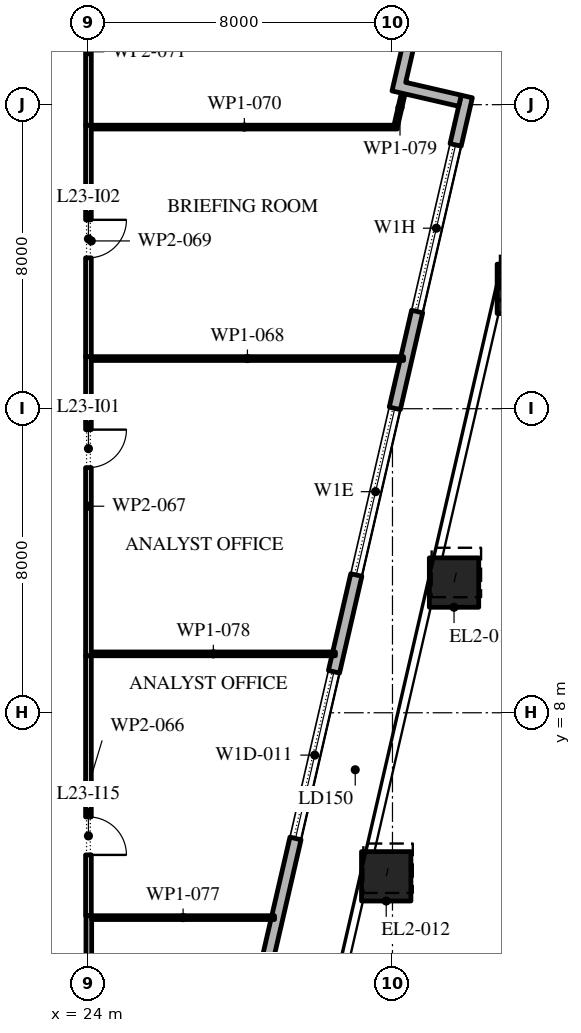
"""IFC4 building model, lengths in metres.
Left out: names, types, materials, properties, quantities, classifications, styles, units other than length and angle.
Written with IfcOpenShell. Run it as: python <this file> out.ifc"""

import sys

from ifc_helpers import new_model, si_unit, direction, frame, frame_2d, origin, origin_2d, place, context, subcontext, project, spatial, polyline, rectangle, outline, extrude, element, fill, save


model = new_model("IFC4")
c1 = context("Model", 3, precision=1e-05, world=origin(), true_north=direction((0.0, 1.0)))
c2 = subcontext(c1, "Body", "Model", "MODEL_VIEW")
j1 = project(units=[si_unit("LENGTHUNIT", "METRE"), si_unit("PLANEANGLEUNIT", "RADIAN")], contexts=[c1])
p1 = place(None, origin())
s1 = spatial("IfcSite", under=j1, at=p1, CompositionType="ELEMENT")
p2 = place(p1, origin())
s2 = spatial("IfcBuilding", under=s1, at=p2, CompositionType="ELEMENT")
p3 = place(p2, frame((0.0, 0.0, 109.8)))
s3 = spatial("IfcBuildingStorey", under=s2, at=p3, CompositionType="ELEMENT", Elevation=109.8)
p4 = place(p3, frame((31.835, 3.697, 0.0), z_axis=(0.01172631027, 0.050562456661, 0.998652057337), x_axis=(-0.974145569572, 0.225921245756, 0.0)))
e1 = element("IfcColumn", 1, at=p4, inside=s3, PredefinedType="COLUMN", context=c2, shape_type="SweptSolid", body=[
    extrude(rectangle(XDim=1.3, YDim=1.3, at=origin_2d()), origin(), (0.0, 0.0, 1.0), 4.206),
])
p5 = place(p3, frame((33.62, 11.426, 0.0), z_axis=(0.014617836866, 0.063111930596, 0.997899395261), x_axis=(-0.974209784844, 0.225644178107, 0.0)))
e2 = element("IfcColumn", 2, at=p5, inside=s3, PredefinedType="COLUMN", context=c2, shape_type="SweptSolid", body=[
    extrude(rectangle(XDim=1.3, YDim=1.3, at=origin_2d()), origin(), (0.0, 0.0, 1.0), 4.209),
])
p6 = place(p3, frame((35.404, 19.155, 0.0), z_axis=(0.01744401301, 0.075745265796, 0.996974604049), x_axis=(-0.974491627871, 0.224423856151, 0.0)))
e3 = element("IfcColumn", 3, at=p6, inside=s3, PredefinedType="COLUMN", context=c2, shape_type="SweptSolid", body=[
    extrude(rectangle(XDim=1.3, YDim=1.3, at=origin_2d()), origin(), (0.0, 0.0, 1.0), 4.213),
])
p7 = place(p3, frame((22.82, -24.016, 0.0), z_axis=(0.0, 0.0, 1.0), x_axis=(0.224953880882, 0.974369412223, 0.0)))
e4 = element("IfcWall", 4, at=p7, inside=s3, PredefinedType="STANDARD", context=c2, shape_type="SweptSolid", body=[
    extrude(rectangle(XDim=49.5, YDim=0.3, at=frame_2d((24.75, 0.0))), origin(), (0.0, 0.0, 1.0), 4.0),
])
p8 = place(p7, frame((1.157, 0.0, 0.45)))
e5 = element("IfcOpeningElement", 5, at=p8, cuts=e4, PredefinedType="OPENING", context=c2, shape_type="SweptSolid", body=[
    extrude(rectangle(XDim=4.5, YDim=3.05, at=frame_2d((2.25, 1.525))), frame((0.0, 0.16, 0.0), z_axis=(0.0, -1.0, 0.0), x_axis=(1.0, 0.0, 0.0)), (0.0, 0.0, 1.0), 0.32),
])
p9 = place(p7, frame((8.121, 0.0, 0.45)))
e6 = element("IfcOpeningElement", 6, at=p9, cuts=e4, PredefinedType="OPENING", context=c2, shape_type="SweptSolid", body=[
    extrude(rectangle(XDim=4.5, YDim=3.05, at=frame_2d((2.25, 1.525))), frame((0.0, 0.16, 0.0), z_axis=(0.0, -1.0, 0.0), x_axis=(1.0, 0.0, 0.0)), (0.0, 0.0, 1.0), 0.32),
])
p10 = place(p7, frame((15.236, 0.0, 0.45)))
e7 = element("IfcOpeningElement", 7, at=p10, cuts=e4, PredefinedType="OPENING", context=c2, shape_type="SweptSolid", body=[
    extrude(rectangle(XDim=4.5, YDim=3.05, at=frame_2d((2.25, 1.525))), frame((0.0, 0.16, 0.0), z_axis=(0.0, -1.0, 0.0), x_axis=(1.0, 0.0, 0.0)), (0.0, 0.0, 1.0), 0.32),
])
p11 = place(p7, frame((23.4, 0.0, 0.0)))
e8 = element("IfcOpeningElement", 8, at=p11, cuts=e4, PredefinedType="OPENING", context=c2, shape_type="SweptSolid", body=[
    extrude(rectangle(XDim=2.4, YDim=3.5, at=frame_2d((1.2, 1.75))), frame((0.0, 0.16, 0.0), z_axis=(0.0, -1.0, 0.0), x_axis=(1.0, 0.0, 0.0)), (0.0, 0.0, 1.0), 0.32),
])
p12 = place(p7, frame((29.464, 0.0, 0.45)))
e9 = element("IfcOpeningElement", 9, at=p12, cuts=e4, PredefinedType="OPENING", context=c2, shape_type="SweptSolid", body=[
    extrude(rectangle(XDim=4.5, YDim=2.875, at=frame_2d((2.25, 1.438))), frame((0.0, 0.16, 0.0), z_axis=(0.0, -1.0, 0.0), x_axis=(1.0, 0.0, 0.0)), (0.0, 0.0, 1.0), 0.32),
])
p13 = place(p7, frame((36.579, 0.0, 0.45)))
e10 = element("IfcOpeningElement", 10, at=p13, cuts=e4, PredefinedType="OPENING", context=c2, shape_type="SweptSolid", body=[
    extrude(rectangle(XDim=4.5, YDim=2.825, at=frame_2d((2.25, 1.413))), frame((0.0, 0.16, 0.0), z_axis=(0.0, -1.0, 0.0), x_axis=(1.0, 0.0, 0.0)), (0.0, 0.0, 1.0), 0.32),
])
p14 = place(p7, frame((43.693, 0.0, 0.45)))
e11 = element("IfcOpeningElement", 11, at=p14, cuts=e4, PredefinedType="OPENING", context=c2, shape_type="SweptSolid", body=[
    extrude(rectangle(XDim=4.5, YDim=2.75, at=frame_2d((2.25, 1.375))), frame((0.0, 0.16, 0.0), z_axis=(0.0, -1.0, 0.0), x_axis=(1.0, 0.0, 0.0)), (0.0, 0.0, 1.0), 0.32),
])
p15 = place(p3, origin())
e12 = element("IfcWall", 12, at=p15, inside=s3, PredefinedType="STANDARD", context=c2, shape_type="SweptSolid", body=[
    extrude(outline(polyline([(32.393, 26.116), (30.639, 26.521), (31.111, 28.567), (31.404, 28.5), (30.999, 26.746), (32.753, 26.341), (32.348, 24.587), (33.809, 24.25), (33.742, 23.957), (31.988, 24.362), (32.393, 26.116)])), origin(), (0.0, 0.0, 1.0), 4.0),
])
p16 = place(p3, frame((24.0, 9.5, 0.0), z_axis=(0.0, 0.0, 1.0), x_axis=(0.0, -1.0, 0.0)))
e13 = element("IfcWall", 13, at=p16, inside=s3, PredefinedType="PARTITIONING", context=c2, shape_type="SweptSolid", body=[
    extrude(rectangle(XDim=6.84, YDim=0.15, at=frame_2d((3.42, 0.0))), origin(), (0.0, 0.0, 1.0), 4.0),
])
p17 = place(p16, frame((4.24, 0.0, 0.0)))
e14 = element("IfcOpeningElement", 14, at=p17, cuts=e13, PredefinedType="OPENING", context=c2, shape_type="SweptSolid", body=[
    extrude(rectangle(XDim=1.0, YDim=2.1, at=frame_2d((0.5, 1.05))), frame((0.0, 0.085, 0.0), z_axis=(0.0, -1.0, 0.0), x_axis=(1.0, 0.0, 0.0)), (0.0, 0.0, 1.0), 0.17),
])
p18 = place(p3, frame((24.0, 17.37, 0.0), z_axis=(0.0, 0.0, 1.0), x_axis=(0.0, -1.0, 0.0)))
e15 = element("IfcWall", 15, at=p18, inside=s3, PredefinedType="PARTITIONING", context=c2, shape_type="SweptSolid", body=[
    extrude(rectangle(XDim=7.87, YDim=0.15, at=frame_2d((3.935, 0.0))), origin(), (0.0, 0.0, 1.0), 4.0),
])
p19 = place(p18, frame((1.92, 0.0, 0.0)))
e16 = element("IfcOpeningElement", 16, at=p19, cuts=e15, PredefinedType="OPENING", context=c2, shape_type="SweptSolid", body=[
    extrude(rectangle(XDim=1.0, YDim=2.1, at=frame_2d((0.5, 1.05))), frame((0.0, 0.085, 0.0), z_axis=(0.0, -1.0, 0.0), x_axis=(1.0, 0.0, 0.0)), (0.0, 0.0, 1.0), 0.17),
])
p20 = place(p3, frame((24.075, 17.32, 0.0), z_axis=(0.0, 0.0, 1.0), x_axis=(1.0, 0.0, 0.0)))
e17 = element("IfcWall", 17, at=p20, inside=s3, PredefinedType="PARTITIONING", context=c2, shape_type="SweptSolid", body=[
    extrude(rectangle(XDim=8.217, YDim=0.1, at=frame_2d((4.108, 0.0))), origin(), (0.0, 0.0, 1.0), 4.0),
])
p21 = place(p3, frame((24.0, 23.46, 0.0), z_axis=(0.0, 0.0, 1.0), x_axis=(0.0, -1.0, 0.0)))
e18 = element("IfcWall", 18, at=p21, inside=s3, PredefinedType="PARTITIONING", context=c2, shape_type="SweptSolid", body=[
    extrude(rectangle(XDim=6.09, YDim=0.15, at=frame_2d((3.045, 0.0))), origin(), (0.0, 0.0, 1.0), 4.0),
])
p22 = place(p21, frame((2.49, 0.0, 0.0)))
e19 = element("IfcOpeningElement", 19, at=p22, cuts=e18, PredefinedType="OPENING", context=c2, shape_type="SweptSolid", body=[
    extrude(rectangle(XDim=1.0, YDim=2.1, at=frame_2d((0.5, 1.05))), frame((0.0, 0.085, 0.0), z_axis=(0.0, -1.0, 0.0), x_axis=(1.0, 0.0, 0.0)), (0.0, 0.0, 1.0), 0.17),
])
p23 = place(p3, frame((24.075, 23.41, 0.0), z_axis=(0.0, 0.0, 1.0), x_axis=(1.0, 0.0, 0.0)))
e20 = element("IfcWall", 20, at=p23, inside=s3, PredefinedType="PARTITIONING", context=c2, shape_type="SweptSolid", body=[
    extrude(rectangle(XDim=8.055, YDim=0.1, at=frame_2d((4.027, 0.0))), origin(), (0.0, 0.0, 1.0), 4.0),
])
p24 = place(p3, frame((24.0, 27.325, 0.0), z_axis=(0.0, 0.0, 1.0), x_axis=(0.0, -1.0, 0.0)))
e21 = element("IfcWall", 21, at=p24, inside=s3, PredefinedType="PARTITIONING", context=c2, shape_type="SweptSolid", body=[
    extrude(rectangle(XDim=3.865, YDim=0.15, at=frame_2d((1.933, 0.0))), origin(), (0.0, 0.0, 1.0), 4.0),
])
p25 = place(p3, frame((24.01, 2.66, 0.0), z_axis=(0.0, 0.0, 1.0), x_axis=(0.0, -1.0, 0.0)))
e22 = element("IfcWall", 22, at=p25, inside=s3, PredefinedType="PARTITIONING", context=c2, shape_type="SweptSolid", body=[
    extrude(rectangle(XDim=10.275, YDim=0.15, at=frame_2d((5.137, 0.0))), origin(), (0.0, 0.0, 1.0), 4.0),
])
p26 = place(p25, frame((2.7, 0.0, 0.0)))
e23 = element("IfcOpeningElement", 23, at=p26, cuts=e22, PredefinedType="OPENING", context=c2, shape_type="SweptSolid", body=[
    extrude(rectangle(XDim=1.0, YDim=2.1, at=frame_2d((0.5, 1.05))), frame((0.0, 0.085, 0.0), z_axis=(0.0, -1.0, 0.0), x_axis=(1.0, 0.0, 0.0)), (0.0, 0.0, 1.0), 0.17),
])
p27 = place(p3, frame((28.896, 2.61, 0.0), z_axis=(0.0, 0.0, 1.0), x_axis=(-1.0, 0.0, 0.0)))
e24 = element("IfcWall", 24, at=p27, inside=s3, PredefinedType="PARTITIONING", context=c2, shape_type="SweptSolid", body=[
    extrude(rectangle(XDim=4.811, YDim=0.1, at=frame_2d((2.406, 0.0))), origin(), (0.0, 0.0, 1.0), 4.0),
])
p28 = place(p3, frame((30.498, 9.55, 0.0), z_axis=(0.0, 0.0, 1.0), x_axis=(-1.0, 0.0, 0.0)))
e25 = element("IfcWall", 25, at=p28, inside=s3, PredefinedType="PARTITIONING", context=c2, shape_type="SweptSolid", body=[
    extrude(rectangle(XDim=6.423, YDim=0.1, at=frame_2d((3.211, 0.0))), origin(), (0.0, 0.0, 1.0), 4.0),
])
p29 = place(p3, frame((32.091, 23.459, 0.0), z_axis=(0.0, 0.0, 1.0), x_axis=(0.223406444343, 0.97472537703, 0.0)))
e26 = element("IfcWall", 26, at=p29, inside=s3, PredefinedType="PARTITIONING", context=c2, shape_type="SweptSolid", body=[
    extrude(rectangle(XDim=0.957, YDim=0.1, at=frame_2d((0.479, 0.0))), origin(), (0.0, 0.0, 1.0), 4.0),
])
p30 = place(p12, origin())
e27 = element("IfcWindow", 27, at=p30, inside=s3, PartitioningType="DOUBLE_PANEL_VERTICAL", PredefinedType="WINDOW", context=c2, shape_type="SweptSolid", body=[
    extrude(rectangle(XDim=4.5, YDim=2.875, at=frame_2d((2.25, 1.438))), frame((0.0, 0.03, 0.0), z_axis=(0.0, -1.0, 0.0), x_axis=(1.0, 0.0, 0.0)), (0.0, 0.0, 1.0), 0.06),
])
fill(e9, e27)
p31 = place(p13, origin())
e28 = element("IfcWindow", 28, at=p31, inside=s3, PartitioningType="DOUBLE_PANEL_VERTICAL", PredefinedType="WINDOW", context=c2, shape_type="SweptSolid", body=[
    extrude(rectangle(XDim=4.5, YDim=2.825, at=frame_2d((2.25, 1.413))), frame((0.0, 0.03, 0.0), z_axis=(0.0, -1.0, 0.0), x_axis=(1.0, 0.0, 0.0)), (0.0, 0.0, 1.0), 0.06),
])
fill(e10, e28)
p32 = place(p14, origin())
e29 = element("IfcWindow", 29, at=p32, inside=s3, PartitioningType="DOUBLE_PANEL_VERTICAL", PredefinedType="WINDOW", context=c2, shape_type="SweptSolid", body=[
    extrude(rectangle(XDim=4.5, YDim=2.75, at=frame_2d((2.25, 1.375))), frame((0.0, 0.03, 0.0), z_axis=(0.0, -1.0, 0.0), x_axis=(1.0, 0.0, 0.0)), (0.0, 0.0, 1.0), 0.06),
])
fill(e11, e29)
p33 = place(p19, origin())
e30 = element("IfcDoor", 30, at=p33, inside=s3, OperationType="SINGLE_SWING_RIGHT", PredefinedType="DOOR", context=c2, shape_type="SweptSolid", body=[
    extrude(rectangle(XDim=1.0, YDim=2.1, at=frame_2d((0.5, 1.05))), frame((0.0, 0.025, 0.0), z_axis=(0.0, -1.0, 0.0), x_axis=(1.0, 0.0, 0.0)), (0.0, 0.0, 1.0), 0.05),
])
fill(e16, e30)
p34 = place(p22, origin())
e31 = element("IfcDoor", 31, at=p34, inside=s3, OperationType="SINGLE_SWING_RIGHT", PredefinedType="DOOR", context=c2, shape_type="SweptSolid", body=[
    extrude(rectangle(XDim=1.0, YDim=2.1, at=frame_2d((0.5, 1.05))), frame((0.0, 0.025, 0.0), z_axis=(0.0, -1.0, 0.0), x_axis=(1.0, 0.0, 0.0)), (0.0, 0.0, 1.0), 0.05),
])
fill(e19, e31)
p35 = place(p17, origin())
e32 = element("IfcDoor", 32, at=p35, inside=s3, OperationType="SINGLE_SWING_LEFT", PredefinedType="DOOR", context=c2, shape_type="SweptSolid", body=[
    extrude(rectangle(XDim=1.0, YDim=2.1, at=frame_2d((0.5, 1.05))), frame((0.0, 0.025, 0.0), z_axis=(0.0, -1.0, 0.0), x_axis=(1.0, 0.0, 0.0)), (0.0, 0.0, 1.0), 0.05),
])
fill(e14, e32)
save(model, sys.argv[1])
